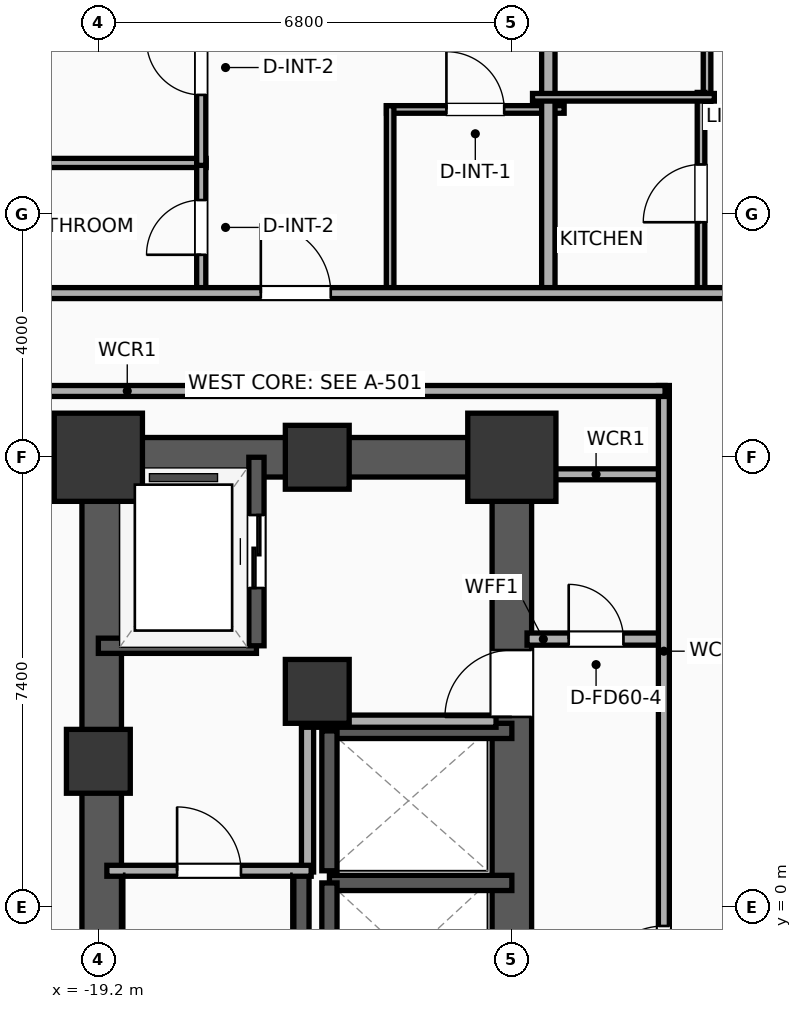
"""IFC4 building model, lengths in metres.
Left out: names, types, materials, properties, quantities, classifications, styles, units other than length and angle.
Written with IfcOpenShell. Run it as: python <this file> out.ifc"""

import sys

from ifc_helpers import new_model, si_unit, direction, frame, frame_2d, origin, origin_2d, place, context, subcontext, project, spatial, rectangle, extrude, element, fill, save


model = new_model("IFC4")
c1 = context("Model", 3, precision=1e-05, world=origin(), true_north=direction((0.0, 1.0)))
c2 = subcontext(c1, "Body", "Model", "MODEL_VIEW")
j1 = project(units=[si_unit("LENGTHUNIT", "METRE"), si_unit("PLANEANGLEUNIT", "RADIAN")], contexts=[c1])
p1 = place(None, origin())
s1 = spatial("IfcSite", under=j1, at=p1, CompositionType="ELEMENT")
p2 = place(p1, origin())
s2 = spatial("IfcBuilding", under=s1, at=p2, CompositionType="ELEMENT")
p3 = place(p2, frame((0.0, 0.0, 33.8)))
s3 = spatial("IfcBuildingStorey", under=s2, at=p3, CompositionType="ELEMENT", Elevation=33.8)
p4 = place(p3, frame((-19.2, 2.4, 0.0), z_axis=(0.0, 0.0, 1.0), x_axis=(1.0, 0.0, 0.0)))
e1 = element("IfcColumn", 1, at=p4, inside=s3, PredefinedType="COLUMN", context=c2, shape_type="SweptSolid", body=[
    extrude(rectangle(XDim=1.05, YDim=1.05, at=origin_2d()), origin(), (0.0, 0.0, 1.0), 3.9),
])
p5 = place(p3, frame((-19.2, 7.4, 0.0), z_axis=(0.0, 0.0, 1.0), x_axis=(1.0, 0.0, 0.0)))
e2 = element("IfcColumn", 2, at=p5, inside=s3, PredefinedType="COLUMN", context=c2, shape_type="SweptSolid", body=[
    extrude(rectangle(XDim=1.45, YDim=1.45, at=origin_2d()), origin(), (0.0, 0.0, 1.0), 3.9),
])
for number, where, z_axis, x_axis in (
    (3, (-15.6, 7.4, 0.0), (0.0, 0.0, 1.0), (1.0, 0.0, 0.0)),
    (4, (-15.6, 3.55, 0.0), (0.0, 0.0, 1.0), (1.0, 0.0, 0.0)),
):
    element("IfcColumn", number, at=place(p3, frame(where, z_axis=z_axis, x_axis=x_axis)), inside=s3, PredefinedType="COLUMN", context=c2, shape_type="SweptSolid", body=[
        extrude(rectangle(XDim=1.05, YDim=1.05, at=origin_2d()), origin(), (0.0, 0.0, 1.0), 3.9),
    ])
p6 = place(p3, frame((-12.4, 7.4, 0.0), z_axis=(0.0, 0.0, 1.0), x_axis=(1.0, 0.0, 0.0)))
e5 = element("IfcColumn", 5, at=p6, inside=s3, PredefinedType="COLUMN", context=c2, shape_type="SweptSolid", body=[
    extrude(rectangle(XDim=1.45, YDim=1.45, at=origin_2d()), origin(), (0.0, 0.0, 1.0), 3.9),
])
p7 = place(p3, frame((-19.525, 7.4, 0.0), z_axis=(0.0, 0.0, 1.0), x_axis=(1.0, 0.0, 0.0)))
e6 = element("IfcWall", 6, at=p7, inside=s3, PredefinedType="SHEAR", context=c2, shape_type="SweptSolid", body=[
    extrude(rectangle(XDim=7.45, YDim=0.65, at=frame_2d((3.725, 0.0))), origin(), (0.0, 0.0, 1.0), 3.65),
])
p8 = place(p3, frame((-19.145, -7.4, 0.0), z_axis=(0.0, 0.0, 1.0), x_axis=(0.0, 1.0, 0.0)))
e7 = element("IfcWall", 7, at=p8, inside=s3, PredefinedType="SHEAR", context=c2, shape_type="SweptSolid", body=[
    extrude(rectangle(XDim=14.8, YDim=0.65, at=frame_2d((7.4, 0.0))), origin(), (0.0, 0.0, 1.0), 3.65),
])
p9 = place(p3, frame((-12.4, -7.4, 0.0), z_axis=(0.0, 0.0, 1.0), x_axis=(0.0, 1.0, 0.0)))
e8 = element("IfcWall", 8, at=p9, inside=s3, PredefinedType="SHEAR", context=c2, shape_type="SweptSolid", body=[
    extrude(rectangle(XDim=14.8, YDim=0.65, at=frame_2d((7.4, 0.0))), origin(), (0.0, 0.0, 1.0), 3.65),
])
p10 = place(p9, frame((0.85, 0.0, 0.0)))
e9 = element("IfcOpeningElement", 9, at=p10, cuts=e8, PredefinedType="OPENING", context=c2, shape_type="SweptSolid", body=[
    extrude(rectangle(XDim=1.1, YDim=2.05, at=frame_2d((0.55, 1.025))), frame((0.0, 0.335, 0.0), z_axis=(0.0, -1.0, 0.0), x_axis=(1.0, 0.0, 0.0)), (0.0, 0.0, 1.0), 0.67),
])
p11 = place(p9, frame((3.45, 0.0, 0.0)))
e10 = element("IfcOpeningElement", 10, at=p11, cuts=e8, PredefinedType="OPENING", context=c2, shape_type="SweptSolid", body=[
    extrude(rectangle(XDim=1.1, YDim=2.05, at=frame_2d((0.55, 1.025))), frame((0.0, 0.335, 0.0), z_axis=(0.0, -1.0, 0.0), x_axis=(1.0, 0.0, 0.0)), (0.0, 0.0, 1.0), 0.67),
])
p12 = place(p9, frame((10.53, 0.0, 0.0)))
e11 = element("IfcOpeningElement", 11, at=p12, cuts=e8, PredefinedType="OPENING", context=c2, shape_type="SweptSolid", body=[
    extrude(rectangle(XDim=1.1, YDim=2.05, at=frame_2d((0.55, 1.025))), frame((0.0, 0.335, 0.0), z_axis=(0.0, -1.0, 0.0), x_axis=(1.0, 0.0, 0.0)), (0.0, 0.0, 1.0), 0.67),
])
p13 = place(p3, frame((-15.86, -7.085, 0.0), z_axis=(0.0, 0.0, 1.0), x_axis=(0.0, 1.0, 0.0)))
e12 = element("IfcWall", 12, at=p13, inside=s3, PredefinedType="SOLIDWALL", context=c2, shape_type="SweptSolid", body=[
    extrude(rectangle(XDim=7.685, YDim=0.25, at=frame_2d((3.843, 0.0))), origin(), (0.0, 0.0, 1.0), 3.65),
])
p14 = place(p3, frame((-19.2, 4.3, 0.0), z_axis=(0.0, 0.0, 1.0), x_axis=(1.0, 0.0, 0.0)))
e13 = element("IfcWall", 13, at=p14, inside=s3, PredefinedType="SOLIDWALL", context=c2, shape_type="SweptSolid", body=[
    extrude(rectangle(XDim=2.6, YDim=0.25, at=frame_2d((1.3, 0.0))), origin(), (0.0, 0.0, 1.0), 3.65),
])
p15 = place(p3, frame((-16.6, 4.3, 0.0), z_axis=(0.0, 0.0, 1.0), x_axis=(0.0, 1.0, 0.0)))
e14 = element("IfcWall", 14, at=p15, inside=s3, PredefinedType="SOLIDWALL", context=c2, shape_type="SweptSolid", body=[
    extrude(rectangle(XDim=3.1, YDim=0.25, at=frame_2d((1.55, 0.0))), origin(), (0.0, 0.0, 1.0), 3.65),
])
p16 = place(p15, frame((0.95, 0.0, 0.0)))
e15 = element("IfcOpeningElement", 15, at=p16, cuts=e14, PredefinedType="OPENING", context=c2, shape_type="SweptSolid", body=[
    extrude(rectangle(XDim=1.2, YDim=2.05, at=frame_2d((0.6, 1.025))), frame((0.0, 0.135, 0.0), z_axis=(0.0, -1.0, 0.0), x_axis=(1.0, 0.0, 0.0)), (0.0, 0.0, 1.0), 0.27),
])
p17 = place(p3, frame((-12.4, 0.4, 0.0), z_axis=(0.0, 0.0, 1.0), x_axis=(-1.0, 0.0, 0.0)))
e16 = element("IfcWall", 16, at=p17, inside=s3, PredefinedType="SOLIDWALL", context=c2, shape_type="SweptSolid", body=[
    extrude(rectangle(XDim=3.0, YDim=0.25, at=frame_2d((1.5, 0.0))), origin(), (0.0, 0.0, 1.0), 3.65),
])
p18 = place(p3, frame((-15.4, 0.4, 0.0), z_axis=(0.0, 0.0, 1.0), x_axis=(0.0, -1.0, 0.0)))
e17 = element("IfcWall", 17, at=p18, inside=s3, PredefinedType="SOLIDWALL", context=c2, shape_type="SweptSolid", body=[
    extrude(rectangle(XDim=2.4, YDim=0.25, at=frame_2d((1.2, 0.0))), origin(), (0.0, 0.0, 1.0), 3.65),
])
p19 = place(p3, frame((-12.4, 2.9, 0.0), z_axis=(0.0, 0.0, 1.0), x_axis=(-1.0, 0.0, 0.0)))
e18 = element("IfcWall", 18, at=p19, inside=s3, PredefinedType="SOLIDWALL", context=c2, shape_type="SweptSolid", body=[
    extrude(rectangle(XDim=3.0, YDim=0.25, at=frame_2d((1.5, 0.0))), origin(), (0.0, 0.0, 1.0), 3.65),
])
p20 = place(p3, frame((-15.4, 2.9, 0.0), z_axis=(0.0, 0.0, 1.0), x_axis=(0.0, -1.0, 0.0)))
e19 = element("IfcWall", 19, at=p20, inside=s3, PredefinedType="SOLIDWALL", context=c2, shape_type="SweptSolid", body=[
    extrude(rectangle(XDim=2.3, YDim=0.25, at=frame_2d((1.15, 0.0))), origin(), (0.0, 0.0, 1.0), 3.65),
])
p21 = place(p3, frame((-15.76, 0.58, 0.0), z_axis=(0.0, 0.0, 1.0), x_axis=(0.0, 1.0, 0.0)))
e20 = element("IfcWall", 20, at=p21, inside=s3, PredefinedType="PARTITIONING", context=c2, shape_type="SweptSolid", body=[
    extrude(rectangle(XDim=2.52, YDim=0.2, at=frame_2d((1.26, 0.0))), origin(), (0.0, 0.0, 1.0), 3.65),
])
p22 = place(p3, frame((-15.82, 3.06, 0.0), z_axis=(0.0, 0.0, 1.0), x_axis=(1.0, 0.0, 0.0)))
e21 = element("IfcWall", 21, at=p22, inside=s3, PredefinedType="PARTITIONING", context=c2, shape_type="SweptSolid", body=[
    extrude(rectangle(XDim=3.16, YDim=0.2, at=frame_2d((1.58, 0.0))), origin(), (0.0, 0.0, 1.0), 3.65),
])
p23 = place(p3, frame((-19.06, 0.6, 0.0), z_axis=(0.0, 0.0, 1.0), x_axis=(1.0, 0.0, 0.0)))
e22 = element("IfcWall", 22, at=p23, inside=s3, PredefinedType="PARTITIONING", context=c2, shape_type="SweptSolid", body=[
    extrude(rectangle(XDim=3.36, YDim=0.18, at=frame_2d((1.68, 0.0))), origin(), (0.0, 0.0, 1.0), 3.65),
])
p24 = place(p23, frame((1.155, 0.0, 0.0)))
e23 = element("IfcOpeningElement", 23, at=p24, cuts=e22, PredefinedType="OPENING", context=c2, shape_type="SweptSolid", body=[
    extrude(rectangle(XDim=1.05, YDim=2.05, at=frame_2d((0.525, 1.025))), frame((0.0, 0.1, 0.0), z_axis=(0.0, -1.0, 0.0), x_axis=(1.0, 0.0, 0.0)), (0.0, 0.0, 1.0), 0.2),
])
p25 = place(p3, frame((-12.15, 4.41, 0.0), z_axis=(0.0, 0.0, 1.0), x_axis=(1.0, 0.0, 0.0)))
e24 = element("IfcWall", 24, at=p25, inside=s3, PredefinedType="PARTITIONING", context=c2, shape_type="SweptSolid", body=[
    extrude(rectangle(XDim=2.27, YDim=0.2, at=frame_2d((1.135, 0.0))), origin(), (0.0, 0.0, 1.0), 3.65),
])
p26 = place(p25, frame((0.685, 0.0, 0.0)))
e25 = element("IfcOpeningElement", 25, at=p26, cuts=e24, PredefinedType="OPENING", context=c2, shape_type="SweptSolid", body=[
    extrude(rectangle(XDim=0.9, YDim=2.05, at=frame_2d((0.45, 1.025))), frame((0.0, 0.11, 0.0), z_axis=(0.0, -1.0, 0.0), x_axis=(1.0, 0.0, 0.0)), (0.0, 0.0, 1.0), 0.22),
])
p27 = place(p3, frame((-12.15, 7.12, 0.0), z_axis=(0.0, 0.0, 1.0), x_axis=(1.0, 0.0, 0.0)))
e26 = element("IfcWall", 26, at=p27, inside=s3, PredefinedType="PARTITIONING", context=c2, shape_type="SweptSolid", body=[
    extrude(rectangle(XDim=2.27, YDim=0.18, at=frame_2d((1.135, 0.0))), origin(), (0.0, 0.0, 1.0), 2.94),
])
p28 = place(p3, frame((-9.9, -8.58, 0.0), z_axis=(0.0, 0.0, 1.0), x_axis=(0.0, 1.0, 0.0)))
e27 = element("IfcWall", 27, at=p28, inside=s3, PredefinedType="PARTITIONING", context=c2, shape_type="SweptSolid", body=[
    extrude(rectangle(XDim=17.16, YDim=0.18, at=frame_2d((8.58, 0.0))), origin(), (0.0, 0.0, 1.0), 3.65),
])
p29 = place(p28, frame((7.172, 0.0, 0.0)))
e28 = element("IfcOpeningElement", 28, at=p29, cuts=e27, PredefinedType="OPENING", context=c2, shape_type="SweptSolid", body=[
    extrude(rectangle(XDim=1.1, YDim=2.05, at=frame_2d((0.55, 1.025))), frame((0.0, 0.1, 0.0), z_axis=(0.0, -1.0, 0.0), x_axis=(1.0, 0.0, 0.0)), (0.0, 0.0, 1.0), 0.2),
])
p30 = place(p3, frame((-33.41, 8.49, 0.0), z_axis=(0.0, 0.0, 1.0), x_axis=(1.0, 0.0, 0.0)))
e29 = element("IfcWall", 29, at=p30, inside=s3, PredefinedType="PARTITIONING", context=c2, shape_type="SweptSolid", body=[
    extrude(rectangle(XDim=23.53, YDim=0.18, at=frame_2d((11.765, 0.0))), origin(), (0.0, 0.0, 1.0), 3.65),
])
p31 = place(p30, frame((4.54, 0.0, 0.0)))
e30 = element("IfcOpeningElement", 30, at=p31, cuts=e29, PredefinedType="OPENING", context=c2, shape_type="SweptSolid", body=[
    extrude(rectangle(XDim=1.15, YDim=2.05, at=frame_2d((0.575, 1.025))), frame((0.0, 0.1, 0.0), z_axis=(0.0, -1.0, 0.0), x_axis=(1.0, 0.0, 0.0)), (0.0, 0.0, 1.0), 0.2),
])
p32 = place(p3, frame((-21.06, 12.24, 0.0), z_axis=(0.0, 0.0, 1.0), x_axis=(1.0, 0.0, 0.0)))
e31 = element("IfcWall", 31, at=p32, inside=s3, PredefinedType="PLUMBINGWALL", context=c2, shape_type="SweptSolid", body=[
    extrude(rectangle(XDim=3.632, YDim=0.15, at=frame_2d((1.816, 0.0))), origin(), (0.0, 0.0, 1.0), 3.65),
])
p33 = place(p3, frame((-17.508, 10.08, 0.0), z_axis=(0.0, 0.0, 1.0), x_axis=(0.0, 1.0, 0.0)))
e32 = element("IfcWall", 32, at=p33, inside=s3, PredefinedType="PLUMBINGWALL", context=c2, shape_type="SweptSolid", body=[
    extrude(rectangle(XDim=2.2, YDim=0.15, at=frame_2d((1.1, 0.0))), origin(), (0.0, 0.0, 1.0), 3.65),
])
p34 = place(p33, frame((0.65, 0.0, 0.0)))
e33 = element("IfcOpeningElement", 33, at=p34, cuts=e32, PredefinedType="OPENING", context=c2, shape_type="SweptSolid", body=[
    extrude(rectangle(XDim=0.9, YDim=2.05, at=frame_2d((0.45, 1.025))), frame((0.0, 0.085, 0.0), z_axis=(0.0, -1.0, 0.0), x_axis=(1.0, 0.0, 0.0)), (0.0, 0.0, 1.0), 0.17),
])
p35 = place(p3, frame((-17.508, 12.2, 0.0), z_axis=(0.0, 0.0, 1.0), x_axis=(0.0, 1.0, 0.0)))
e34 = element("IfcWall", 34, at=p35, inside=s3, PredefinedType="PLUMBINGWALL", context=c2, shape_type="SweptSolid", body=[
    extrude(rectangle(XDim=10.058, YDim=0.15, at=frame_2d((5.029, 0.0))), origin(), (0.0, 0.0, 1.0), 3.65),
])
p36 = place(p35, frame((1.159, 0.0, 0.0)))
e35 = element("IfcOpeningElement", 35, at=p36, cuts=e34, PredefinedType="OPENING", context=c2, shape_type="SweptSolid", body=[
    extrude(rectangle(XDim=0.9, YDim=2.05, at=frame_2d((0.45, 1.025))), frame((0.0, 0.085, 0.0), z_axis=(0.0, -1.0, 0.0), x_axis=(1.0, 0.0, 0.0)), (0.0, 0.0, 1.0), 0.17),
])
p37 = place(p3, frame((-14.462, 13.12, 0.0), z_axis=(0.0, 0.0, 1.0), x_axis=(1.0, 0.0, 0.0)))
e36 = element("IfcWall", 36, at=p37, inside=s3, PredefinedType="PARTITIONING", context=c2, shape_type="SweptSolid", body=[
    extrude(rectangle(XDim=2.922, YDim=0.125, at=frame_2d((1.461, 0.0))), origin(), (0.0, 0.0, 1.0), 3.65),
])
p38 = place(p37, frame((0.986, 0.0, 0.0)))
e37 = element("IfcOpeningElement", 37, at=p38, cuts=e36, PredefinedType="OPENING", context=c2, shape_type="SweptSolid", body=[
    extrude(rectangle(XDim=0.95, YDim=2.05, at=frame_2d((0.475, 1.025))), frame((0.0, 0.073, 0.0), z_axis=(0.0, -1.0, 0.0), x_axis=(1.0, 0.0, 0.0)), (0.0, 0.0, 1.0), 0.145),
])
p39 = place(p3, frame((-14.402, 10.08, 0.0), z_axis=(0.0, 0.0, 1.0), x_axis=(0.0, 1.0, 0.0)))
e38 = element("IfcWall", 38, at=p39, inside=s3, PredefinedType="PARTITIONING", context=c2, shape_type="SweptSolid", body=[
    extrude(rectangle(XDim=3.1, YDim=0.125, at=frame_2d((1.55, 0.0))), origin(), (0.0, 0.0, 1.0), 3.65),
])
p40 = place(p3, frame((-11.8, 10.02, 0.0), z_axis=(0.0, 0.0, 1.0), x_axis=(0.0, 1.0, 0.0)))
e39 = element("IfcWall", 39, at=p40, inside=s3, PredefinedType="PARTITIONING", context=c2, shape_type="SweptSolid", body=[
    extrude(rectangle(XDim=12.19, YDim=0.22, at=frame_2d((6.095, 0.0))), origin(), (0.0, 0.0, 1.0), 2.94),
])
p41 = place(p3, frame((-9.19, 13.24, 0.0), z_axis=(0.0, 0.0, 1.0), x_axis=(0.0, 1.0, 0.0)))
e40 = element("IfcWall", 40, at=p41, inside=s3, PredefinedType="PARTITIONING", context=c2, shape_type="SweptSolid", body=[
    extrude(rectangle(XDim=9.12, YDim=0.125, at=frame_2d((4.56, 0.0))), origin(), (0.0, 0.0, 1.0), 2.94),
])
p42 = place(p41, frame((0.984, 0.0, 0.0)))
e41 = element("IfcOpeningElement", 41, at=p42, cuts=e40, PredefinedType="OPENING", context=c2, shape_type="SweptSolid", body=[
    extrude(rectangle(XDim=0.95, YDim=2.05, at=frame_2d((0.475, 1.025))), frame((0.0, 0.073, 0.0), z_axis=(0.0, -1.0, 0.0), x_axis=(1.0, 0.0, 0.0)), (0.0, 0.0, 1.0), 0.145),
])
p43 = place(p3, frame((-9.289, 10.08, 0.0), z_axis=(0.0, 0.0, 1.0), x_axis=(0.0, 1.0, 0.0)))
e42 = element("IfcWall", 42, at=p43, inside=s3, PredefinedType="PARTITIONING", context=c2, shape_type="SweptSolid", body=[
    extrude(rectangle(XDim=3.32, YDim=0.125, at=frame_2d((1.66, 0.0))), origin(), (0.0, 0.0, 1.0), 3.65),
])
p44 = place(p43, frame((1.185, 0.0, 0.0)))
e43 = element("IfcOpeningElement", 43, at=p44, cuts=e42, PredefinedType="OPENING", context=c2, shape_type="SweptSolid", body=[
    extrude(rectangle(XDim=0.95, YDim=2.05, at=frame_2d((0.475, 1.025))), frame((0.0, 0.073, 0.0), z_axis=(0.0, -1.0, 0.0), x_axis=(1.0, 0.0, 0.0)), (0.0, 0.0, 1.0), 0.145),
])
p45 = place(p3, frame((-12.06, 13.32, 0.0), z_axis=(0.0, 0.0, 1.0), x_axis=(1.0, 0.0, 0.0)))
e44 = element("IfcWall", 44, at=p45, inside=s3, PredefinedType="PARTITIONING", context=c2, shape_type="SweptSolid", body=[
    extrude(rectangle(XDim=2.99, YDim=0.125, at=frame_2d((1.495, 0.0))), origin(), (0.0, 0.0, 1.0), 3.65),
])
p46 = place(p3, frame((-33.41, 10.1, 0.0), z_axis=(0.0, 0.0, 1.0), x_axis=(1.0, 0.0, 0.0)))
e45 = element("IfcWall", 45, at=p46, inside=s3, PredefinedType="PARTITIONING", context=c2, shape_type="SweptSolid", body=[
    extrude(rectangle(XDim=59.62, YDim=0.18, at=frame_2d((29.81, 0.0))), origin(), (0.0, 0.0, 1.0), 3.65),
])
p47 = place(p46, frame((2.793, 0.0, 0.0)))
e46 = element("IfcOpeningElement", 46, at=p47, cuts=e45, PredefinedType="OPENING", context=c2, shape_type="SweptSolid", body=[
    extrude(rectangle(XDim=0.9, YDim=2.05, at=frame_2d((0.45, 1.025))), frame((0.0, 0.1, 0.0), z_axis=(0.0, -1.0, 0.0), x_axis=(1.0, 0.0, 0.0)), (0.0, 0.0, 1.0), 0.2),
])
p48 = place(p46, frame((10.037, 0.0, 0.0)))
e47 = element("IfcOpeningElement", 47, at=p48, cuts=e45, PredefinedType="OPENING", context=c2, shape_type="SweptSolid", body=[
    extrude(rectangle(XDim=1.15, YDim=2.05, at=frame_2d((0.575, 1.025))), frame((0.0, 0.1, 0.0), z_axis=(0.0, -1.0, 0.0), x_axis=(1.0, 0.0, 0.0)), (0.0, 0.0, 1.0), 0.2),
])
p49 = place(p46, frame((16.882, 0.0, 0.0)))
e48 = element("IfcOpeningElement", 48, at=p49, cuts=e45, PredefinedType="OPENING", context=c2, shape_type="SweptSolid", body=[
    extrude(rectangle(XDim=1.15, YDim=2.05, at=frame_2d((0.575, 1.025))), frame((0.0, 0.1, 0.0), z_axis=(0.0, -1.0, 0.0), x_axis=(1.0, 0.0, 0.0)), (0.0, 0.0, 1.0), 0.2),
])
p50 = place(p46, frame((25.801, 0.0, 0.0)))
e49 = element("IfcOpeningElement", 49, at=p50, cuts=e45, PredefinedType="OPENING", context=c2, shape_type="SweptSolid", body=[
    extrude(rectangle(XDim=1.15, YDim=2.05, at=frame_2d((0.575, 1.025))), frame((0.0, 0.1, 0.0), z_axis=(0.0, -1.0, 0.0), x_axis=(1.0, 0.0, 0.0)), (0.0, 0.0, 1.0), 0.2),
])
p51 = place(p46, frame((34.72, 0.0, 0.0)))
e50 = element("IfcOpeningElement", 50, at=p51, cuts=e45, PredefinedType="OPENING", context=c2, shape_type="SweptSolid", body=[
    extrude(rectangle(XDim=1.15, YDim=2.05, at=frame_2d((0.575, 1.025))), frame((0.0, 0.1, 0.0), z_axis=(0.0, -1.0, 0.0), x_axis=(1.0, 0.0, 0.0)), (0.0, 0.0, 1.0), 0.2),
])
p52 = place(p46, frame((43.771, 0.0, 0.0)))
e51 = element("IfcOpeningElement", 51, at=p52, cuts=e45, PredefinedType="OPENING", context=c2, shape_type="SweptSolid", body=[
    extrude(rectangle(XDim=1.15, YDim=2.05, at=frame_2d((0.575, 1.025))), frame((0.0, 0.1, 0.0), z_axis=(0.0, -1.0, 0.0), x_axis=(1.0, 0.0, 0.0)), (0.0, 0.0, 1.0), 0.2),
])
p53 = place(p46, frame((49.715, 0.0, 0.0)))
e52 = element("IfcOpeningElement", 52, at=p53, cuts=e45, PredefinedType="OPENING", context=c2, shape_type="SweptSolid", body=[
    extrude(rectangle(XDim=1.15, YDim=2.05, at=frame_2d((0.575, 1.025))), frame((0.0, 0.1, 0.0), z_axis=(0.0, -1.0, 0.0), x_axis=(1.0, 0.0, 0.0)), (0.0, 0.0, 1.0), 0.2),
])
p54 = place(p46, frame((56.654, 0.0, 0.0)))
e53 = element("IfcOpeningElement", 53, at=p54, cuts=e45, PredefinedType="OPENING", context=c2, shape_type="SweptSolid", body=[
    extrude(rectangle(XDim=0.9, YDim=2.05, at=frame_2d((0.45, 1.025))), frame((0.0, 0.1, 0.0), z_axis=(0.0, -1.0, 0.0), x_axis=(1.0, 0.0, 0.0)), (0.0, 0.0, 1.0), 0.2),
])
p55 = place(p16, origin())
e54 = element("IfcDoor", 54, at=p55, inside=s3, OperationType="SLIDING_TO_LEFT", PredefinedType="DOOR", context=c2, shape_type="SweptSolid", body=[
    extrude(rectangle(XDim=1.2, YDim=2.05, at=frame_2d((0.6, 1.025))), frame((0.0, 0.025, 0.0), z_axis=(0.0, -1.0, 0.0), x_axis=(1.0, 0.0, 0.0)), (0.0, 0.0, 1.0), 0.05),
])
fill(e15, e54)
p56 = place(p24, origin())
e55 = element("IfcDoor", 55, at=p56, inside=s3, OperationType="SINGLE_SWING_LEFT", PredefinedType="DOOR", context=c2, shape_type="SweptSolid", body=[
    extrude(rectangle(XDim=1.05, YDim=2.05, at=frame_2d((0.525, 1.025))), frame((0.0, 0.025, 0.0), z_axis=(0.0, -1.0, 0.0), x_axis=(1.0, 0.0, 0.0)), (0.0, 0.0, 1.0), 0.05),
])
fill(e23, e55)
p57 = place(p26, origin())
e56 = element("IfcDoor", 56, at=p57, inside=s3, OperationType="SINGLE_SWING_LEFT", PredefinedType="DOOR", context=c2, shape_type="SweptSolid", body=[
    extrude(rectangle(XDim=0.9, YDim=2.05, at=frame_2d((0.45, 1.025))), frame((0.0, 0.025, 0.0), z_axis=(0.0, -1.0, 0.0), x_axis=(1.0, 0.0, 0.0)), (0.0, 0.0, 1.0), 0.05),
])
fill(e25, e56)
p58 = place(p29, origin())
e57 = element("IfcDoor", 57, at=p58, inside=s3, OperationType="SINGLE_SWING_LEFT", PredefinedType="DOOR", context=c2, shape_type="SweptSolid", body=[
    extrude(rectangle(XDim=1.1, YDim=2.05, at=frame_2d((0.55, 1.025))), frame((0.0, 0.025, 0.0), z_axis=(0.0, -1.0, 0.0), x_axis=(1.0, 0.0, 0.0)), (0.0, 0.0, 1.0), 0.05),
])
fill(e28, e57)
p59 = place(p34, origin())
e58 = element("IfcDoor", 58, at=p59, inside=s3, OperationType="SINGLE_SWING_LEFT", PredefinedType="DOOR", context=c2, shape_type="SweptSolid", body=[
    extrude(rectangle(XDim=0.9, YDim=2.05, at=frame_2d((0.45, 1.025))), frame((0.0, 0.025, 0.0), z_axis=(0.0, -1.0, 0.0), x_axis=(1.0, 0.0, 0.0)), (0.0, 0.0, 1.0), 0.05),
])
fill(e33, e58)
p60 = place(p36, origin())
e59 = element("IfcDoor", 59, at=p60, inside=s3, OperationType="SINGLE_SWING_RIGHT", PredefinedType="DOOR", context=c2, shape_type="SweptSolid", body=[
    extrude(rectangle(XDim=0.9, YDim=2.05, at=frame_2d((0.45, 1.025))), frame((0.0, 0.025, 0.0), z_axis=(0.0, -1.0, 0.0), x_axis=(1.0, 0.0, 0.0)), (0.0, 0.0, 1.0), 0.05),
])
fill(e35, e59)
p61 = place(p38, origin())
e60 = element("IfcDoor", 60, at=p61, inside=s3, OperationType="SINGLE_SWING_LEFT", PredefinedType="DOOR", context=c2, shape_type="SweptSolid", body=[
    extrude(rectangle(XDim=0.95, YDim=2.05, at=frame_2d((0.475, 1.025))), frame((0.0, 0.025, 0.0), z_axis=(0.0, -1.0, 0.0), x_axis=(1.0, 0.0, 0.0)), (0.0, 0.0, 1.0), 0.05),
])
fill(e37, e60)
p62 = place(p44, origin())
e61 = element("IfcDoor", 61, at=p62, inside=s3, OperationType="SINGLE_SWING_LEFT", PredefinedType="DOOR", context=c2, shape_type="SweptSolid", body=[
    extrude(rectangle(XDim=0.95, YDim=2.05, at=frame_2d((0.475, 1.025))), frame((0.0, 0.025, 0.0), z_axis=(0.0, -1.0, 0.0), x_axis=(1.0, 0.0, 0.0)), (0.0, 0.0, 1.0), 0.05),
])
fill(e43, e61)
p63 = place(p49, origin())
e62 = element("IfcDoor", 62, at=p63, inside=s3, OperationType="SINGLE_SWING_LEFT", PredefinedType="DOOR", context=c2, shape_type="SweptSolid", body=[
    extrude(rectangle(XDim=1.15, YDim=2.05, at=frame_2d((0.575, 1.025))), frame((0.0, 0.025, 0.0), z_axis=(0.0, -1.0, 0.0), x_axis=(1.0, 0.0, 0.0)), (0.0, 0.0, 1.0), 0.05),
])
fill(e48, e62)
p64 = place(p12, origin())
e63 = element("IfcDoor", 63, at=p64, inside=s3, OperationType="SINGLE_SWING_LEFT", PredefinedType="DOOR", context=c2, shape_type="SweptSolid", body=[
    extrude(rectangle(XDim=1.1, YDim=2.05, at=frame_2d((0.55, 1.025))), frame((0.0, 0.025, 0.0), z_axis=(0.0, -1.0, 0.0), x_axis=(1.0, 0.0, 0.0)), (0.0, 0.0, 1.0), 0.05),
])
fill(e11, e63)
save(model, sys.argv[1])
